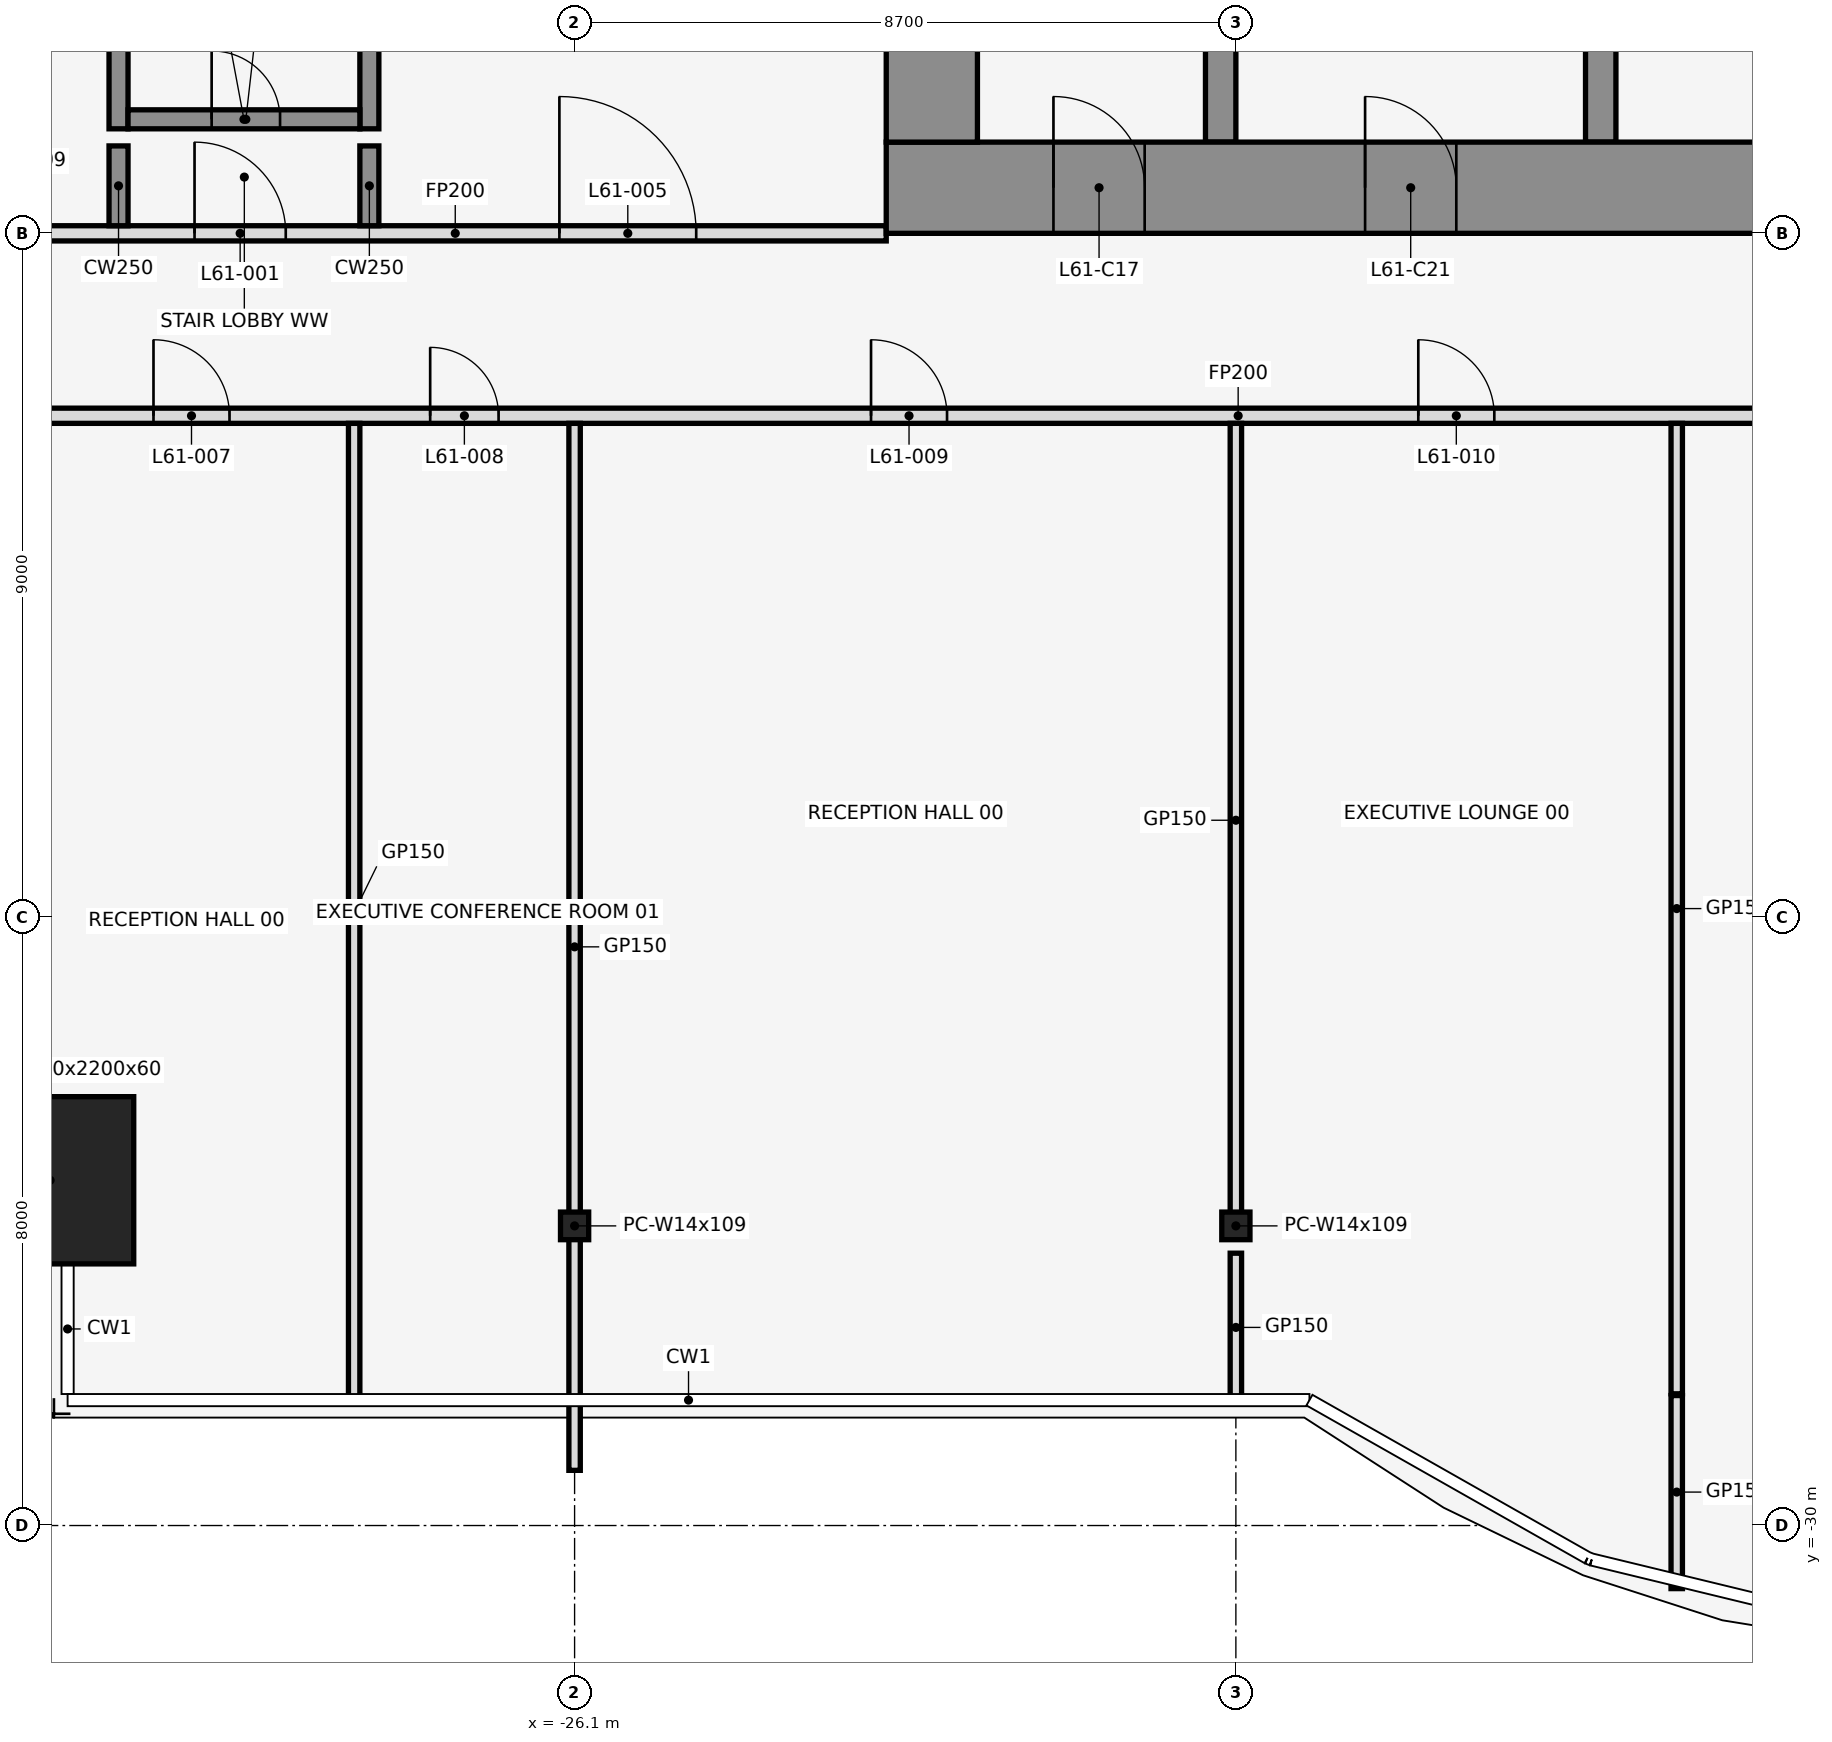
"""IFC4 building model, lengths in metres.
Left out: names, types, materials, properties, quantities, classifications, styles, units other than length and angle.
Written with IfcOpenShell. Run it as: python <this file> out.ifc"""

import sys

from ifc_helpers import new_model, si_unit, direction, frame, frame_2d, origin, origin_2d, place, context, subcontext, project, spatial, rectangle, hollow_rectangle, i_section, extrude, element, fill, save


model = new_model("IFC4")
c1 = context("Model", 3, precision=1e-05, world=origin(), true_north=direction((0.0, 1.0)))
c2 = subcontext(c1, "Body", "Model", "MODEL_VIEW")
j1 = project(units=[si_unit("LENGTHUNIT", "METRE"), si_unit("PLANEANGLEUNIT", "RADIAN")], contexts=[c1])
p1 = place(None, origin())
s1 = spatial("IfcSite", under=j1, at=p1, CompositionType="ELEMENT")
p2 = place(p1, origin())
s2 = spatial("IfcBuilding", under=s1, at=p2, CompositionType="ELEMENT")
p3 = place(p2, frame((0.0, 0.0, 270.8)))
s3 = spatial("IfcBuildingStorey", under=s2, at=p3, CompositionType="ELEMENT", Elevation=270.8)
p4 = place(p3, frame((-33.0, -25.458, 0.0), z_axis=(0.0, 0.0, 1.0), x_axis=(1.0, 0.0, 0.0)))
e1 = element("IfcColumn", 1, at=p4, inside=s3, PredefinedType="COLUMN", context=c2, shape_type="SweptSolid", body=[
    extrude(hollow_rectangle(XDim=2.2, YDim=2.2, WallThickness=0.06, at=origin_2d()), origin(), (0.0, 0.0, 1.0), 4.2),
])
for number, where, z_axis, x_axis in (
    (2, (-26.1, -26.058, 0.0), (0.0, 0.0, 1.0), (1.0, 0.0, 0.0)),
    (3, (-17.4, -26.058, 0.0), (0.0, 0.0, 1.0), (1.0, 0.0, 0.0)),
):
    element("IfcColumn", number, at=place(p3, frame(where, z_axis=z_axis, x_axis=x_axis)), inside=s3, PredefinedType="COLUMN", context=c2, shape_type="SweptSolid", body=[
        extrude(i_section(OverallWidth=0.371, OverallDepth=0.363, WebThickness=0.013, FlangeThickness=0.022, at=origin_2d()), origin(), (0.0, 0.0, 1.0), 4.2),
    ])
p5 = place(p3, frame((-32.1, -11.625, 0.0), z_axis=(0.0, 0.0, 1.0), x_axis=(0.0, 1.0, 0.0)))
e4 = element("IfcWall", 4, at=p5, inside=s3, PredefinedType="SHEAR", context=c2, shape_type="SweptSolid", body=[
    extrude(rectangle(XDim=7.525, YDim=0.25, at=frame_2d((3.762, 0.0))), origin(), (0.0, 0.0, 1.0), 4.2),
])
p6 = place(p3, frame((-28.8, -11.625, 0.0), z_axis=(0.0, 0.0, 1.0), x_axis=(0.0, 1.0, 0.0)))
e5 = element("IfcWall", 5, at=p6, inside=s3, PredefinedType="SHEAR", context=c2, shape_type="SweptSolid", body=[
    extrude(rectangle(XDim=7.25, YDim=0.25, at=frame_2d((3.625, 0.0))), origin(), (0.0, 0.0, 1.0), 4.2),
])
p7 = place(p3, frame((-31.975, -11.5, 0.0), z_axis=(0.0, 0.0, 1.0), x_axis=(1.0, 0.0, 0.0)))
e6 = element("IfcWall", 6, at=p7, inside=s3, PredefinedType="SHEAR", context=c2, shape_type="SweptSolid", body=[
    extrude(rectangle(XDim=3.05, YDim=0.25, at=frame_2d((1.525, 0.0))), origin(), (0.0, 0.0, 1.0), 4.2),
])
p8 = place(p7, frame((1.1, 0.0, 0.0)))
e7 = element("IfcOpeningElement", 7, at=p8, cuts=e6, PredefinedType="OPENING", context=c2, shape_type="SweptSolid", body=[
    extrude(rectangle(XDim=0.9, YDim=2.1, at=frame_2d((0.45, 1.05))), frame((0.0, 0.137, 0.0), z_axis=(0.0, -1.0, 0.0), x_axis=(1.0, 0.0, 0.0)), (0.0, 0.0, 1.0), 0.274),
])
p9 = place(p3, frame((-33.34, -15.4, 0.0), z_axis=(0.0, 0.0, 1.0), x_axis=(1.0, 0.0, 0.0)))
e8 = element("IfcWall", 8, at=p9, inside=s3, PredefinedType="PARTITIONING", context=c2, shape_type="SweptSolid", body=[
    extrude(rectangle(XDim=31.94, YDim=0.2, at=frame_2d((15.97, 0.0))), origin(), (0.0, 0.0, 1.0), 3.118),
])
p10 = place(p9, frame((1.7, 0.0, 0.0)))
e9 = element("IfcOpeningElement", 9, at=p10, cuts=e8, PredefinedType="OPENING", context=c2, shape_type="SweptSolid", body=[
    extrude(rectangle(XDim=1.0, YDim=2.1, at=frame_2d((0.5, 1.05))), frame((0.0, 0.112, 0.0), z_axis=(0.0, -1.0, 0.0), x_axis=(1.0, 0.0, 0.0)), (0.0, 0.0, 1.0), 0.224),
])
p11 = place(p9, frame((5.34, 0.0, 0.0)))
e10 = element("IfcOpeningElement", 10, at=p11, cuts=e8, PredefinedType="OPENING", context=c2, shape_type="SweptSolid", body=[
    extrude(rectangle(XDim=0.9, YDim=2.1, at=frame_2d((0.45, 1.05))), frame((0.0, 0.112, 0.0), z_axis=(0.0, -1.0, 0.0), x_axis=(1.0, 0.0, 0.0)), (0.0, 0.0, 1.0), 0.224),
])
p12 = place(p9, frame((11.14, 0.0, 0.0)))
e11 = element("IfcOpeningElement", 11, at=p12, cuts=e8, PredefinedType="OPENING", context=c2, shape_type="SweptSolid", body=[
    extrude(rectangle(XDim=1.0, YDim=2.1, at=frame_2d((0.5, 1.05))), frame((0.0, 0.112, 0.0), z_axis=(0.0, -1.0, 0.0), x_axis=(1.0, 0.0, 0.0)), (0.0, 0.0, 1.0), 0.224),
])
p13 = place(p9, frame((18.34, 0.0, 0.0)))
e12 = element("IfcOpeningElement", 12, at=p13, cuts=e8, PredefinedType="OPENING", context=c2, shape_type="SweptSolid", body=[
    extrude(rectangle(XDim=1.0, YDim=2.1, at=frame_2d((0.5, 1.05))), frame((0.0, 0.112, 0.0), z_axis=(0.0, -1.0, 0.0), x_axis=(1.0, 0.0, 0.0)), (0.0, 0.0, 1.0), 0.224),
])
p14 = place(p3, frame((-33.34, -13.0, 0.0), z_axis=(0.0, 0.0, 1.0), x_axis=(1.0, 0.0, 0.0)))
e13 = element("IfcWall", 13, at=p14, inside=s3, PredefinedType="PARTITIONING", context=c2, shape_type="SweptSolid", body=[
    extrude(rectangle(XDim=11.34, YDim=0.2, at=frame_2d((5.67, 0.0))), origin(), (0.0, 0.0, 1.0), 3.118),
])
p15 = place(p14, frame((2.24, 0.0, 0.0)))
e14 = element("IfcOpeningElement", 14, at=p15, cuts=e13, PredefinedType="OPENING", context=c2, shape_type="SweptSolid", body=[
    extrude(rectangle(XDim=1.2, YDim=2.1, at=frame_2d((0.6, 1.05))), frame((0.0, 0.112, 0.0), z_axis=(0.0, -1.0, 0.0), x_axis=(1.0, 0.0, 0.0)), (0.0, 0.0, 1.0), 0.224),
])
p16 = place(p14, frame((7.04, 0.0, 0.0)))
e15 = element("IfcOpeningElement", 15, at=p16, cuts=e13, PredefinedType="OPENING", context=c2, shape_type="SweptSolid", body=[
    extrude(rectangle(XDim=1.8, YDim=2.1, at=frame_2d((0.9, 1.05))), frame((0.0, 0.112, 0.0), z_axis=(0.0, -1.0, 0.0), x_axis=(1.0, 0.0, 0.0)), (0.0, 0.0, 1.0), 0.224),
])
p17 = place(p3, frame((-32.1, -12.9, 0.0), z_axis=(0.0, 0.0, 1.0), x_axis=(0.0, 1.0, 0.0)))
e16 = element("IfcWall", 16, at=p17, inside=s3, PredefinedType="SHEAR", context=c2, shape_type="SweptSolid", body=[
    extrude(rectangle(XDim=1.05, YDim=0.25, at=frame_2d((0.525, 0.0))), origin(), (0.0, 0.0, 1.0), 4.2),
])
p18 = place(p3, frame((-29.0, -28.37, 0.0), z_axis=(0.0, 0.0, 1.0), x_axis=(0.0, 1.0, 0.0)))
e17 = element("IfcWall", 17, at=p18, inside=s3, PredefinedType="PARTITIONING", context=c2, shape_type="SweptSolid", body=[
    extrude(rectangle(XDim=12.87, YDim=0.15, at=frame_2d((6.435, 0.0))), origin(), (0.0, 0.0, 1.0), 3.118),
])
p19 = place(p3, frame((-28.8, -12.9, 0.0), z_axis=(0.0, 0.0, 1.0), x_axis=(0.0, 1.0, 0.0)))
e18 = element("IfcWall", 18, at=p19, inside=s3, PredefinedType="SHEAR", context=c2, shape_type="SweptSolid", body=[
    extrude(rectangle(XDim=1.05, YDim=0.25, at=frame_2d((0.525, 0.0))), origin(), (0.0, 0.0, 1.0), 4.2),
])
p20 = place(p3, frame((-26.1, -29.274, 0.0), z_axis=(0.0, 0.0, 1.0), x_axis=(0.0, 1.0, 0.0)))
e19 = element("IfcWall", 19, at=p20, inside=s3, PredefinedType="PARTITIONING", context=c2, shape_type="SweptSolid", body=[
    extrude(rectangle(XDim=13.774, YDim=0.15, at=frame_2d((6.887, 0.0))), origin(), (0.0, 0.0, 1.0), 3.118),
])
p21 = place(p3, frame((-17.4, -28.37, 0.0), z_axis=(0.0, 0.0, 1.0), x_axis=(0.0, 1.0, 0.0)))
e20 = element("IfcWall", 20, at=p21, inside=s3, PredefinedType="PARTITIONING", context=c2, shape_type="SweptSolid", body=[
    extrude(rectangle(XDim=1.953, YDim=0.15, at=frame_2d((0.977, 0.0))), origin(), (0.0, 0.0, 1.0), 3.118),
])
p22 = place(p3, frame((-17.4, -25.943, 0.0), z_axis=(0.0, 0.0, 1.0), x_axis=(0.0, 1.0, 0.0)))
e21 = element("IfcWall", 21, at=p22, inside=s3, PredefinedType="PARTITIONING", context=c2, shape_type="SweptSolid", body=[
    extrude(rectangle(XDim=10.443, YDim=0.15, at=frame_2d((5.221, 0.0))), origin(), (0.0, 0.0, 1.0), 3.118),
])
p23 = place(p3, frame((-11.6, -30.83, 0.0), z_axis=(0.0, 0.0, 1.0), x_axis=(0.0, 1.0, 0.0)))
e22 = element("IfcWall", 22, at=p23, inside=s3, PredefinedType="PARTITIONING", context=c2, shape_type="SweptSolid", body=[
    extrude(rectangle(XDim=2.54, YDim=0.15, at=frame_2d((1.27, 0.0))), origin(), (0.0, 0.0, 1.0), 3.118),
])
p24 = place(p3, frame((-11.6, -28.267, 0.0), z_axis=(0.0, 0.0, 1.0), x_axis=(0.0, 1.0, 0.0)))
e23 = element("IfcWall", 23, at=p24, inside=s3, PredefinedType="PARTITIONING", context=c2, shape_type="SweptSolid", body=[
    extrude(rectangle(XDim=12.767, YDim=0.15, at=frame_2d((6.384, 0.0))), origin(), (0.0, 0.0, 1.0), 3.118),
])
p25 = place(p3, frame((-17.6, -11.8, 0.0), z_axis=(0.0, 0.0, 1.0), x_axis=(0.0, 1.0, 0.0)))
e24 = element("IfcWall", 24, at=p25, inside=s3, PredefinedType="SHEAR", context=c2, shape_type="SweptSolid", body=[
    extrude(rectangle(XDim=10.6, YDim=0.4, at=frame_2d((5.3, 0.0))), origin(), (0.0, 0.0, 1.0), 4.2),
])
p26 = place(p25, frame((1.25, 0.0, 0.0)))
e25 = element("IfcOpeningElement", 25, at=p26, cuts=e24, PredefinedType="OPENING", context=c2, shape_type="SweptSolid", body=[
    extrude(rectangle(XDim=1.1, YDim=2.1, at=frame_2d((0.55, 1.05))), frame((0.0, 0.212, 0.0), z_axis=(0.0, -1.0, 0.0), x_axis=(1.0, 0.0, 0.0)), (0.0, 0.0, 1.0), 0.424),
])
p27 = place(p25, frame((3.95, 0.0, 0.0)))
e26 = element("IfcOpeningElement", 26, at=p27, cuts=e24, PredefinedType="OPENING", context=c2, shape_type="SweptSolid", body=[
    extrude(rectangle(XDim=1.1, YDim=2.1, at=frame_2d((0.55, 1.05))), frame((0.0, 0.212, 0.0), z_axis=(0.0, -1.0, 0.0), x_axis=(1.0, 0.0, 0.0)), (0.0, 0.0, 1.0), 0.424),
])
p28 = place(p3, frame((-12.6, -11.8, 0.0), z_axis=(0.0, 0.0, 1.0), x_axis=(0.0, 1.0, 0.0)))
e27 = element("IfcWall", 27, at=p28, inside=s3, PredefinedType="SHEAR", context=c2, shape_type="SweptSolid", body=[
    extrude(rectangle(XDim=10.6, YDim=0.4, at=frame_2d((5.3, 0.0))), origin(), (0.0, 0.0, 1.0), 4.2),
])
p29 = place(p28, frame((4.75, 0.0, 0.0)))
e28 = element("IfcOpeningElement", 28, at=p29, cuts=e27, PredefinedType="OPENING", context=c2, shape_type="SweptSolid", body=[
    extrude(rectangle(XDim=1.1, YDim=2.1, at=frame_2d((0.55, 1.05))), frame((0.0, 0.212, 0.0), z_axis=(0.0, -1.0, 0.0), x_axis=(1.0, 0.0, 0.0)), (0.0, 0.0, 1.0), 0.424),
])
p30 = place(p3, frame((-22.0, -12.4, 0.0), z_axis=(0.0, 0.0, 1.0), x_axis=(1.0, 0.0, 0.0)))
e29 = element("IfcWall", 29, at=p30, inside=s3, PredefinedType="SHEAR", context=c2, shape_type="SweptSolid", body=[
    extrude(rectangle(XDim=44.0, YDim=1.2, at=frame_2d((22.0, 0.0))), origin(), (0.0, 0.0, 1.0), 4.2),
])
p31 = place(p30, frame((2.2, 0.0, 0.0)))
e30 = element("IfcOpeningElement", 30, at=p31, cuts=e29, PredefinedType="OPENING", context=c2, shape_type="SweptSolid", body=[
    extrude(rectangle(XDim=1.2, YDim=2.1, at=frame_2d((0.6, 1.05))), frame((0.0, 0.612, 0.0), z_axis=(0.0, -1.0, 0.0), x_axis=(1.0, 0.0, 0.0)), (0.0, 0.0, 1.0), 1.224),
])
p32 = place(p30, frame((21.4, 0.0, 0.0)))
e31 = element("IfcOpeningElement", 31, at=p32, cuts=e29, PredefinedType="OPENING", context=c2, shape_type="SweptSolid", body=[
    extrude(rectangle(XDim=1.2, YDim=2.1, at=frame_2d((0.6, 1.05))), frame((0.0, 0.612, 0.0), z_axis=(0.0, -1.0, 0.0), x_axis=(1.0, 0.0, 0.0)), (0.0, 0.0, 1.0), 1.224),
])
p33 = place(p30, frame((40.6, 0.0, 0.0)))
e32 = element("IfcOpeningElement", 32, at=p33, cuts=e29, PredefinedType="OPENING", context=c2, shape_type="SweptSolid", body=[
    extrude(rectangle(XDim=1.2, YDim=2.1, at=frame_2d((0.6, 1.05))), frame((0.0, 0.612, 0.0), z_axis=(0.0, -1.0, 0.0), x_axis=(1.0, 0.0, 0.0)), (0.0, 0.0, 1.0), 1.224),
])
p34 = place(p30, frame((16.0, 0.0, 0.0)))
e33 = element("IfcOpeningElement", 33, at=p34, cuts=e29, PredefinedType="OPENING", context=c2, shape_type="SweptSolid", body=[
    extrude(rectangle(XDim=1.8, YDim=2.1, at=frame_2d((0.9, 1.05))), frame((0.0, 0.612, 0.0), z_axis=(0.0, -1.0, 0.0), x_axis=(1.0, 0.0, 0.0)), (0.0, 0.0, 1.0), 1.224),
])
p35 = place(p30, frame((6.3, 0.0, 0.0)))
e34 = element("IfcOpeningElement", 34, at=p35, cuts=e29, PredefinedType="OPENING", context=c2, shape_type="SweptSolid", body=[
    extrude(rectangle(XDim=1.2, YDim=2.1, at=frame_2d((0.6, 1.05))), frame((0.0, 0.612, 0.0), z_axis=(0.0, -1.0, 0.0), x_axis=(1.0, 0.0, 0.0)), (0.0, 0.0, 1.0), 1.224),
])
p36 = place(p30, frame((26.2, 0.0, 0.0)))
e35 = element("IfcOpeningElement", 35, at=p36, cuts=e29, PredefinedType="OPENING", context=c2, shape_type="SweptSolid", body=[
    extrude(rectangle(XDim=1.8, YDim=2.1, at=frame_2d((0.9, 1.05))), frame((0.0, 0.612, 0.0), z_axis=(0.0, -1.0, 0.0), x_axis=(1.0, 0.0, 0.0)), (0.0, 0.0, 1.0), 1.224),
])
p37 = place(p30, frame((36.5, 0.0, 0.0)))
e36 = element("IfcOpeningElement", 36, at=p37, cuts=e29, PredefinedType="OPENING", context=c2, shape_type="SweptSolid", body=[
    extrude(rectangle(XDim=1.2, YDim=2.1, at=frame_2d((0.6, 1.05))), frame((0.0, 0.612, 0.0), z_axis=(0.0, -1.0, 0.0), x_axis=(1.0, 0.0, 0.0)), (0.0, 0.0, 1.0), 1.224),
])
p38 = place(p3, frame((-21.4, -11.8, 0.0), z_axis=(0.0, 0.0, 1.0), x_axis=(0.0, 1.0, 0.0)))
e37 = element("IfcWall", 37, at=p38, inside=s3, PredefinedType="SHEAR", context=c2, shape_type="SweptSolid", body=[
    extrude(rectangle(XDim=10.6, YDim=1.2, at=frame_2d((5.3, 0.0))), origin(), (0.0, 0.0, 1.0), 4.2),
])
p39 = place(p15, origin())
e38 = element("IfcDoor", 38, at=p39, inside=s3, OperationType="SINGLE_SWING_LEFT", PredefinedType="DOOR", context=c2, shape_type="SweptSolid", body=[
    extrude(rectangle(XDim=1.2, YDim=2.1, at=frame_2d((0.6, 1.05))), frame((0.0, 0.025, 0.0), z_axis=(0.0, -1.0, 0.0), x_axis=(1.0, 0.0, 0.0)), (0.0, 0.0, 1.0), 0.05),
])
fill(e14, e38)
p40 = place(p8, origin())
e39 = element("IfcDoor", 39, at=p40, inside=s3, OperationType="SINGLE_SWING_LEFT", PredefinedType="DOOR", context=c2, shape_type="SweptSolid", body=[
    extrude(rectangle(XDim=0.9, YDim=2.1, at=frame_2d((0.45, 1.05))), frame((0.0, 0.025, 0.0), z_axis=(0.0, -1.0, 0.0), x_axis=(1.0, 0.0, 0.0)), (0.0, 0.0, 1.0), 0.05),
])
fill(e7, e39)
p41 = place(p16, origin())
e40 = element("IfcDoor", 40, at=p41, inside=s3, OperationType="SINGLE_SWING_LEFT", PredefinedType="DOOR", context=c2, shape_type="SweptSolid", body=[
    extrude(rectangle(XDim=1.8, YDim=2.1, at=frame_2d((0.9, 1.05))), frame((0.0, 0.025, 0.0), z_axis=(0.0, -1.0, 0.0), x_axis=(1.0, 0.0, 0.0)), (0.0, 0.0, 1.0), 0.05),
])
fill(e15, e40)
p42 = place(p10, frame((1.0, 0.0, 0.0), z_axis=(0.0, 0.0, 1.0), x_axis=(-1.0, 0.0, 0.0)))
e41 = element("IfcDoor", 41, at=p42, inside=s3, OperationType="SINGLE_SWING_LEFT", PredefinedType="DOOR", context=c2, shape_type="SweptSolid", body=[
    extrude(rectangle(XDim=1.0, YDim=2.1, at=frame_2d((0.5, 1.05))), frame((0.0, 0.025, 0.0), z_axis=(0.0, -1.0, 0.0), x_axis=(1.0, 0.0, 0.0)), (0.0, 0.0, 1.0), 0.05),
])
fill(e9, e41)
p43 = place(p11, frame((0.9, 0.0, 0.0), z_axis=(0.0, 0.0, 1.0), x_axis=(-1.0, 0.0, 0.0)))
e42 = element("IfcDoor", 42, at=p43, inside=s3, OperationType="SINGLE_SWING_RIGHT", PredefinedType="DOOR", context=c2, shape_type="SweptSolid", body=[
    extrude(rectangle(XDim=0.9, YDim=2.1, at=frame_2d((0.45, 1.05))), frame((0.0, 0.025, 0.0), z_axis=(0.0, -1.0, 0.0), x_axis=(1.0, 0.0, 0.0)), (0.0, 0.0, 1.0), 0.05),
])
fill(e10, e42)
p44 = place(p12, frame((1.0, 0.0, 0.0), z_axis=(0.0, 0.0, 1.0), x_axis=(-1.0, 0.0, 0.0)))
e43 = element("IfcDoor", 43, at=p44, inside=s3, OperationType="SINGLE_SWING_RIGHT", PredefinedType="DOOR", context=c2, shape_type="SweptSolid", body=[
    extrude(rectangle(XDim=1.0, YDim=2.1, at=frame_2d((0.5, 1.05))), frame((0.0, 0.025, 0.0), z_axis=(0.0, -1.0, 0.0), x_axis=(1.0, 0.0, 0.0)), (0.0, 0.0, 1.0), 0.05),
])
fill(e11, e43)
p45 = place(p13, frame((1.0, 0.0, 0.0), z_axis=(0.0, 0.0, 1.0), x_axis=(-1.0, 0.0, 0.0)))
e44 = element("IfcDoor", 44, at=p45, inside=s3, OperationType="SINGLE_SWING_LEFT", PredefinedType="DOOR", context=c2, shape_type="SweptSolid", body=[
    extrude(rectangle(XDim=1.0, YDim=2.1, at=frame_2d((0.5, 1.05))), frame((0.0, 0.025, 0.0), z_axis=(0.0, -1.0, 0.0), x_axis=(1.0, 0.0, 0.0)), (0.0, 0.0, 1.0), 0.05),
])
fill(e12, e44)
p46 = place(p31, frame((1.2, 0.0, 0.0), z_axis=(0.0, 0.0, 1.0), x_axis=(-1.0, 0.0, 0.0)))
e45 = element("IfcDoor", 45, at=p46, inside=s3, OperationType="SINGLE_SWING_RIGHT", PredefinedType="DOOR", context=c2, shape_type="SweptSolid", body=[
    extrude(rectangle(XDim=1.2, YDim=2.1, at=frame_2d((0.6, 1.05))), frame((0.0, 0.025, 0.0), z_axis=(0.0, -1.0, 0.0), x_axis=(1.0, 0.0, 0.0)), (0.0, 0.0, 1.0), 0.05),
])
fill(e30, e45)
p47 = place(p35, frame((1.2, 0.0, 0.0), z_axis=(0.0, 0.0, 1.0), x_axis=(-1.0, 0.0, 0.0)))
e46 = element("IfcDoor", 46, at=p47, inside=s3, OperationType="SINGLE_SWING_RIGHT", PredefinedType="DOOR", context=c2, shape_type="SweptSolid", body=[
    extrude(rectangle(XDim=1.2, YDim=2.1, at=frame_2d((0.6, 1.05))), frame((0.0, 0.025, 0.0), z_axis=(0.0, -1.0, 0.0), x_axis=(1.0, 0.0, 0.0)), (0.0, 0.0, 1.0), 0.05),
])
fill(e34, e46)
save(model, sys.argv[1])
